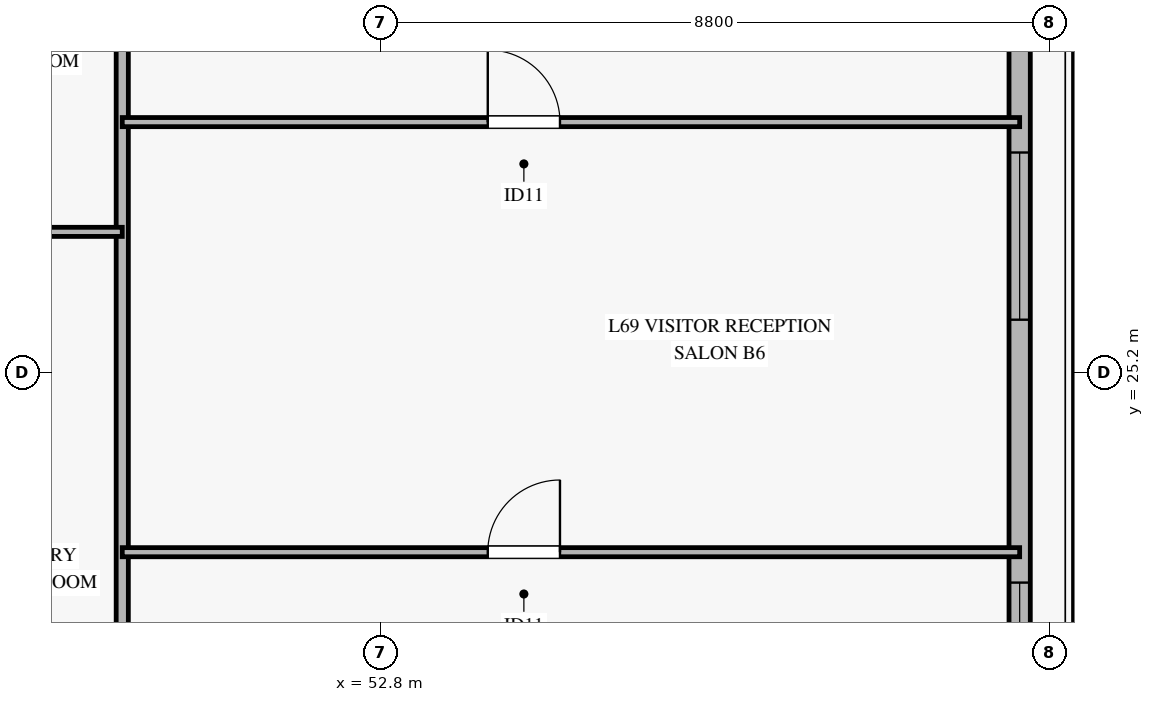
"""IFC4 building model, lengths in metres.
Left out: names, types, materials, properties, quantities, classifications, styles, units other than length and angle.
Written with IfcOpenShell. Run it as: python <this file> out.ifc"""

import sys

from ifc_helpers import new_model, si_unit, direction, frame, frame_2d, origin, place, context, subcontext, project, spatial, rectangle, extrude, source, transform, mapped, element, fill, save


model = new_model("IFC4")
c1 = context("Model", 3, precision=1e-05, world=origin(), true_north=direction((0.0, 1.0)))
c2 = subcontext(c1, "Body", "Model", "MODEL_VIEW")
j1 = project(units=[si_unit("LENGTHUNIT", "METRE"), si_unit("PLANEANGLEUNIT", "RADIAN")], contexts=[c1])
p1 = place(None, origin())
s1 = spatial("IfcSite", under=j1, at=p1, CompositionType="ELEMENT")
p2 = place(p1, origin())
s2 = spatial("IfcBuilding", under=s1, at=p2, CompositionType="ELEMENT")
p3 = place(p2, frame((0.0, 0.0, 268.9)))
s3 = spatial("IfcBuildingStorey", under=s2, at=p3, CompositionType="ELEMENT", Elevation=268.9)
p4 = place(p3, frame((61.207, 19.499, 0.0), z_axis=(0.0, 0.0, 1.0), x_axis=(0.0, 1.0, 0.0)))
e1 = element("IfcWall", 1, at=p4, inside=s3, PredefinedType="SOLIDWALL", context=c2, shape_type="SweptSolid", body=[
    extrude(rectangle(XDim=11.814, YDim=0.28, at=frame_2d((5.907, 0.0))), origin(), (0.0, 0.0, 1.0), 2.815),
])
p5 = place(p4, frame((0.736, 0.0, 0.45)))
e2 = element("IfcOpeningElement", 2, at=p5, cuts=e1, PredefinedType="OPENING", context=c2, shape_type="SweptSolid", body=[
    extrude(rectangle(XDim=2.2, YDim=2.1, at=frame_2d((1.1, 1.05))), frame((0.0, 0.15, 0.0), z_axis=(0.0, -1.0, 0.0), x_axis=(1.0, 0.0, 0.0)), (0.0, 0.0, 1.0), 0.3),
])
p6 = place(p4, frame((6.395, 0.0, 0.45)))
e3 = element("IfcOpeningElement", 3, at=p6, cuts=e1, PredefinedType="OPENING", context=c2, shape_type="SweptSolid", body=[
    extrude(rectangle(XDim=2.2, YDim=2.1, at=frame_2d((1.1, 1.05))), frame((0.0, 0.15, 0.0), z_axis=(0.0, -1.0, 0.0), x_axis=(1.0, 0.0, 0.0)), (0.0, 0.0, 1.0), 0.3),
])
p7 = place(p3, frame((49.4, 16.976, 0.0), z_axis=(0.0, 0.0, 1.0), x_axis=(0.0, 1.0, 0.0)))
e4 = element("IfcWall", 4, at=p7, inside=s3, PredefinedType="PARTITIONING", context=c2, shape_type="SweptSolid", body=[
    extrude(rectangle(XDim=16.924, YDim=0.16, at=frame_2d((8.462, 0.0))), origin(), (0.0, 0.0, 1.0), 2.77),
])
p8 = place(p3, frame((45.72, 27.05, 0.0), z_axis=(0.0, 0.0, 1.0), x_axis=(1.0, 0.0, 0.0)))
e5 = element("IfcWall", 5, at=p8, inside=s3, PredefinedType="PARTITIONING", context=c2, shape_type="SweptSolid", body=[
    extrude(rectangle(XDim=3.68, YDim=0.12, at=frame_2d((1.84, 0.0))), origin(), (0.0, 0.0, 1.0), 2.77),
])
p9 = place(p3, frame((49.4, 22.835, 0.0), z_axis=(0.0, 0.0, 1.0), x_axis=(1.0, 0.0, 0.0)))
e6 = element("IfcWall", 6, at=p9, inside=s3, PredefinedType="PARTITIONING", context=c2, shape_type="SweptSolid", body=[
    extrude(rectangle(XDim=11.807, YDim=0.12, at=frame_2d((5.904, 0.0))), origin(), (0.0, 0.0, 1.0), 2.47),
])
p10 = place(p9, frame((4.809, 0.0, 0.0)))
e7 = element("IfcOpeningElement", 7, at=p10, cuts=e6, PredefinedType="OPENING", context=c2, shape_type="SweptSolid", body=[
    extrude(rectangle(XDim=0.95, YDim=2.1, at=frame_2d((0.475, 1.05))), frame((0.0, 0.07, 0.0), z_axis=(0.0, -1.0, 0.0), x_axis=(1.0, 0.0, 0.0)), (0.0, 0.0, 1.0), 0.14),
])
p11 = place(p3, frame((49.4, 28.494, 0.0), z_axis=(0.0, 0.0, 1.0), x_axis=(1.0, 0.0, 0.0)))
e8 = element("IfcWall", 8, at=p11, inside=s3, PredefinedType="PARTITIONING", context=c2, shape_type="SweptSolid", body=[
    extrude(rectangle(XDim=11.807, YDim=0.12, at=frame_2d((5.904, 0.0))), origin(), (0.0, 0.0, 1.0), 2.47),
])
p12 = place(p11, frame((4.809, 0.0, 0.0)))
e9 = element("IfcOpeningElement", 9, at=p12, cuts=e8, PredefinedType="OPENING", context=c2, shape_type="SweptSolid", body=[
    extrude(rectangle(XDim=0.95, YDim=2.1, at=frame_2d((0.475, 1.05))), frame((0.0, 0.07, 0.0), z_axis=(0.0, -1.0, 0.0), x_axis=(1.0, 0.0, 0.0)), (0.0, 0.0, 1.0), 0.14),
])
m1 = source(origin(), c2, "Body", "SweptSolid", [
    extrude(rectangle(XDim=2.2, YDim=2.1, at=frame_2d((1.1, 1.05))), frame((0.0, 0.03, 0.0), z_axis=(0.0, -1.0, 0.0), x_axis=(1.0, 0.0, 0.0)), (0.0, 0.0, 1.0), 0.06),
])
p13 = place(p5, origin())
e10 = element("IfcWindow", 10, at=p13, inside=s3, PartitioningType="SINGLE_PANEL", PredefinedType="WINDOW", context=c2, shape_type="MappedRepresentation", body=[
    mapped(m1, transform((0.0, 0.0, 0.0), x_axis=(1.0, 0.0, 0.0), y_axis=(0.0, 1.0, 0.0), z_axis=(0.0, 0.0, 1.0), scale=1.0)),
])
fill(e2, e10)
p14 = place(p6, origin())
e11 = element("IfcWindow", 11, at=p14, inside=s3, PartitioningType="SINGLE_PANEL", PredefinedType="WINDOW", context=c2, shape_type="MappedRepresentation", body=[
    mapped(m1, transform((0.0, 0.0, 0.0), x_axis=(1.0, 0.0, 0.0), y_axis=(0.0, 1.0, 0.0), z_axis=(0.0, 0.0, 1.0), scale=1.0)),
])
fill(e3, e11)
m2 = source(origin(), c2, "Body", "SweptSolid", [
    extrude(rectangle(XDim=0.95, YDim=2.1, at=frame_2d((0.475, 1.05))), frame((0.0, 0.025, 0.0), z_axis=(0.0, -1.0, 0.0), x_axis=(1.0, 0.0, 0.0)), (0.0, 0.0, 1.0), 0.05),
])
p15 = place(p12, origin())
e12 = element("IfcDoor", 12, at=p15, inside=s3, OperationType="SINGLE_SWING_LEFT", PredefinedType="DOOR", context=c2, shape_type="MappedRepresentation", body=[
    mapped(m2, transform((0.0, 0.0, 0.0), x_axis=(1.0, 0.0, 0.0), y_axis=(0.0, 1.0, 0.0), z_axis=(0.0, 0.0, 1.0), scale=1.0)),
])
fill(e9, e12)
p16 = place(p10, origin())
e13 = element("IfcDoor", 13, at=p16, inside=s3, OperationType="SINGLE_SWING_RIGHT", PredefinedType="DOOR", context=c2, shape_type="MappedRepresentation", body=[
    mapped(m2, transform((0.0, 0.0, 0.0), x_axis=(1.0, 0.0, 0.0), y_axis=(0.0, 1.0, 0.0), z_axis=(0.0, 0.0, 1.0), scale=1.0)),
])
fill(e7, e13)
save(model, sys.argv[1])
